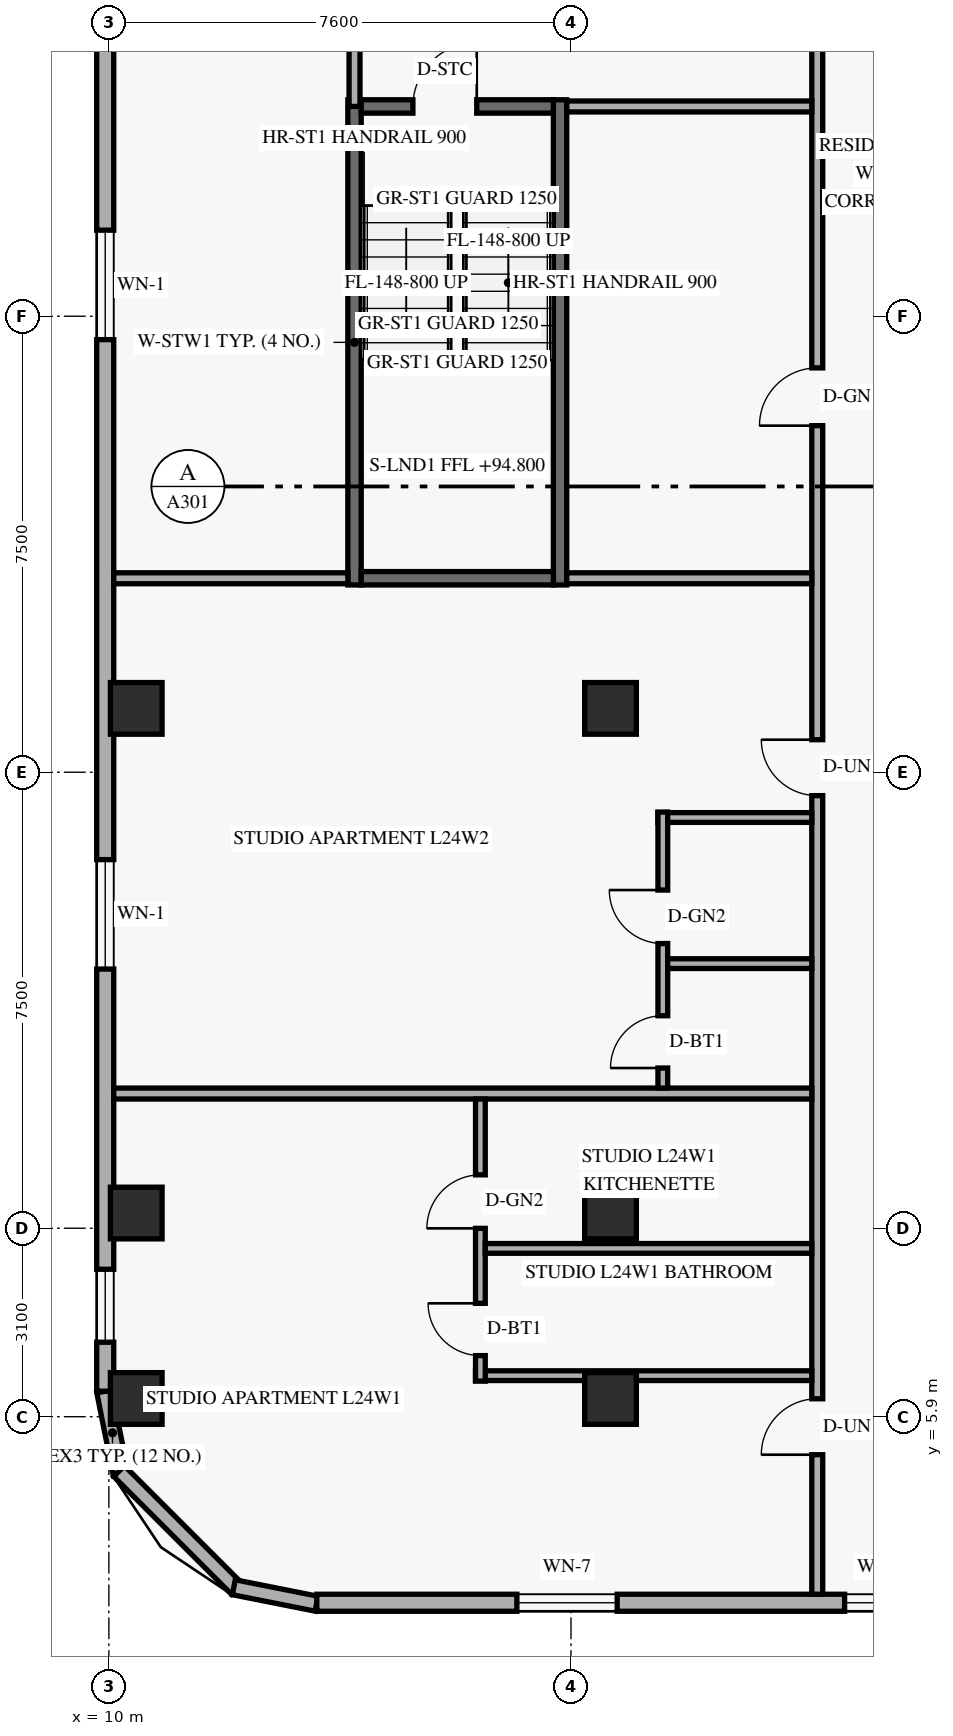
"""IFC4 building model, lengths in metres.
Left out: names, types, materials, properties, quantities, classifications, styles, units other than length and angle.
Written with IfcOpenShell. Run it as: python <this file> out.ifc"""

import sys

from ifc_helpers import new_model, si_unit, direction, frame, frame_2d, origin, origin_2d, place, context, subcontext, project, spatial, rectangle, extrude, element, fill, save


model = new_model("IFC4")
c1 = context("Model", 3, precision=1e-05, world=origin(), true_north=direction((0.0, 1.0)))
c2 = subcontext(c1, "Body", "Model", "MODEL_VIEW")
j1 = project(units=[si_unit("LENGTHUNIT", "METRE"), si_unit("PLANEANGLEUNIT", "RADIAN")], contexts=[c1])
p1 = place(None, origin())
s1 = spatial("IfcSite", under=j1, at=p1, CompositionType="ELEMENT")
p2 = place(p1, origin())
s2 = spatial("IfcBuilding", under=s1, at=p2, CompositionType="ELEMENT")
p3 = place(p2, frame((0.0, 0.0, 94.8)))
s3 = spatial("IfcBuildingStorey", under=s2, at=p3, CompositionType="ELEMENT", Elevation=94.8)
for number, where, z_axis, x_axis in (
    (1, (14.04, 19.58, 0.0), (0.0, 0.0, 1.0), (0.0, 1.0, 0.0)),
    (2, (17.42, 19.58, 0.0), (0.0, 0.0, 1.0), (0.0, 1.0, 0.0)),
):
    element("IfcWall", number, at=place(p3, frame(where, z_axis=z_axis, x_axis=x_axis)), inside=s3, PredefinedType="SHEAR", context=c2, shape_type="SweptSolid", body=[
        extrude(rectangle(XDim=7.98, YDim=0.22, at=frame_2d((3.99, 0.0))), origin(), (0.0, 0.0, 1.0), 2.739),
    ])
p4 = place(p3, frame((14.15, 19.69, 0.0), z_axis=(0.0, 0.0, 1.0), x_axis=(1.0, 0.0, 0.0)))
e3 = element("IfcWall", 3, at=p4, inside=s3, PredefinedType="SHEAR", context=c2, shape_type="SweptSolid", body=[
    extrude(rectangle(XDim=3.16, YDim=0.22, at=frame_2d((1.58, 0.0))), origin(), (0.0, 0.0, 1.0), 2.739),
])
p5 = place(p3, frame((14.15, 27.45, 0.0), z_axis=(0.0, 0.0, 1.0), x_axis=(1.0, 0.0, 0.0)))
e4 = element("IfcWall", 4, at=p5, inside=s3, PredefinedType="SHEAR", context=c2, shape_type="SweptSolid", body=[
    extrude(rectangle(XDim=3.16, YDim=0.22, at=frame_2d((1.58, 0.0))), origin(), (0.0, 0.0, 1.0), 2.739),
])
p6 = place(p5, frame((0.85, 0.0, 0.0)))
e5 = element("IfcOpeningElement", 5, at=p6, cuts=e4, PredefinedType="OPENING", context=c2, shape_type="SweptSolid", body=[
    extrude(rectangle(XDim=1.05, YDim=2.15, at=frame_2d((0.525, 1.075))), frame((0.0, 0.12, 0.0), z_axis=(0.0, -1.0, 0.0), x_axis=(1.0, 0.0, 0.0)), (0.0, 0.0, 1.0), 0.24),
])
for number, where, z_axis, x_axis in (
    (6, (10.45, 6.2, 0.0), (0.0, 0.0, 1.0), (1.0, 0.0, 0.0)),
    (7, (10.45, 9.25, 0.0), (0.0, 0.0, 1.0), (1.0, 0.0, 0.0)),
    (8, (10.45, 17.55, 0.0), (0.0, 0.0, 1.0), (1.0, 0.0, 0.0)),
    (9, (18.25, 6.2, 0.0), (0.0, 0.0, 1.0), (1.0, 0.0, 0.0)),
    (10, (18.25, 9.25, 0.0), (0.0, 0.0, 1.0), (1.0, 0.0, 0.0)),
    (11, (18.25, 17.55, 0.0), (0.0, 0.0, 1.0), (1.0, 0.0, 0.0)),
):
    element("IfcColumn", number, at=place(p3, frame(where, z_axis=z_axis, x_axis=x_axis)), inside=s3, PredefinedType="COLUMN", context=c2, shape_type="SweptSolid", body=[
        extrude(rectangle(XDim=0.85, YDim=0.85, at=origin_2d()), origin(), (0.0, 0.0, 1.0), 3.6),
    ])
p7 = place(p3, frame((9.924, 6.316, 0.0), z_axis=(0.0, 0.0, 1.0), x_axis=(0.195000137217, -0.980803214965, 0.0)))
e12 = element("IfcWall", 12, at=p7, inside=s3, PredefinedType="SOLIDWALL", context=c2, shape_type="SweptSolid", body=[
    extrude(rectangle(XDim=1.388, YDim=0.25, at=frame_2d((0.694, 0.0))), origin(), (0.0, 0.0, 1.0), 3.35),
])
p8 = place(p3, frame((10.168, 5.005, 0.0), z_axis=(0.0, 0.0, 1.0), x_axis=(0.707151344399, -0.707062215165, 0.0)))
e13 = element("IfcWall", 13, at=p8, inside=s3, PredefinedType="SOLIDWALL", context=c2, shape_type="SweptSolid", body=[
    extrude(rectangle(XDim=2.739, YDim=0.25, at=frame_2d((1.37, 0.0))), origin(), (0.0, 0.0, 1.0), 3.35),
])
p9 = place(p3, frame((12.054, 3.095, 0.0), z_axis=(0.0, 0.0, 1.0), x_axis=(0.980809899341, -0.19496651342, 0.0)))
e14 = element("IfcWall", 14, at=p9, inside=s3, PredefinedType="SOLIDWALL", context=c2, shape_type="SweptSolid", body=[
    extrude(rectangle(XDim=1.389, YDim=0.25, at=frame_2d((0.694, 0.0))), origin(), (0.0, 0.0, 1.0), 3.35),
])
p10 = place(p3, frame((13.42, 2.84, 0.0), z_axis=(0.0, 0.0, 1.0), x_axis=(1.0, 0.0, 0.0)))
e15 = element("IfcWall", 15, at=p10, inside=s3, PredefinedType="SOLIDWALL", context=c2, shape_type="SweptSolid", body=[
    extrude(rectangle(XDim=36.56, YDim=0.28, at=frame_2d((18.28, 0.0))), origin(), (0.0, 0.0, 1.0), 3.35),
])
p11 = place(p10, frame((3.29, 0.0, 0.85)))
e16 = element("IfcOpeningElement", 16, at=p11, cuts=e15, PredefinedType="OPENING", context=c2, shape_type="SweptSolid", body=[
    extrude(rectangle(XDim=1.65, YDim=1.6, at=frame_2d((0.825, 0.8))), frame((0.0, 0.15, 0.0), z_axis=(0.0, -1.0, 0.0), x_axis=(1.0, 0.0, 0.0)), (0.0, 0.0, 1.0), 0.3),
])
p12 = place(p10, frame((8.68, 0.0, 0.85)))
e17 = element("IfcOpeningElement", 17, at=p12, cuts=e15, PredefinedType="OPENING", context=c2, shape_type="SweptSolid", body=[
    extrude(rectangle(XDim=1.2, YDim=1.5, at=frame_2d((0.6, 0.75))), frame((0.0, 0.15, 0.0), z_axis=(0.0, -1.0, 0.0), x_axis=(1.0, 0.0, 0.0)), (0.0, 0.0, 1.0), 0.3),
])
p13 = place(p10, frame((12.248, 0.0, 0.85)))
e18 = element("IfcOpeningElement", 18, at=p13, cuts=e15, PredefinedType="OPENING", context=c2, shape_type="SweptSolid", body=[
    extrude(rectangle(XDim=1.65, YDim=1.6, at=frame_2d((0.825, 0.8))), frame((0.0, 0.15, 0.0), z_axis=(0.0, -1.0, 0.0), x_axis=(1.0, 0.0, 0.0)), (0.0, 0.0, 1.0), 0.3),
])
p14 = place(p10, frame((18.083, 0.0, 0.85)))
e19 = element("IfcOpeningElement", 19, at=p14, cuts=e15, PredefinedType="OPENING", context=c2, shape_type="SweptSolid", body=[
    extrude(rectangle(XDim=1.65, YDim=1.6, at=frame_2d((0.825, 0.8))), frame((0.0, 0.15, 0.0), z_axis=(0.0, -1.0, 0.0), x_axis=(1.0, 0.0, 0.0)), (0.0, 0.0, 1.0), 0.3),
])
p15 = place(p10, frame((22.465, 0.0, 0.85)))
e20 = element("IfcOpeningElement", 20, at=p15, cuts=e15, PredefinedType="OPENING", context=c2, shape_type="SweptSolid", body=[
    extrude(rectangle(XDim=1.2, YDim=1.5, at=frame_2d((0.6, 0.75))), frame((0.0, 0.15, 0.0), z_axis=(0.0, -1.0, 0.0), x_axis=(1.0, 0.0, 0.0)), (0.0, 0.0, 1.0), 0.3),
])
p16 = place(p10, frame((29.52, 0.0, 0.85)))
e21 = element("IfcOpeningElement", 21, at=p16, cuts=e15, PredefinedType="OPENING", context=c2, shape_type="SweptSolid", body=[
    extrude(rectangle(XDim=1.65, YDim=1.6, at=frame_2d((0.825, 0.8))), frame((0.0, 0.15, 0.0), z_axis=(0.0, -1.0, 0.0), x_axis=(1.0, 0.0, 0.0)), (0.0, 0.0, 1.0), 0.3),
])
p17 = place(p3, frame((9.94, 41.68, 0.0), z_axis=(0.0, 0.0, 1.0), x_axis=(0.0, -1.0, 0.0)))
e22 = element("IfcWall", 22, at=p17, inside=s3, PredefinedType="SOLIDWALL", context=c2, shape_type="SweptSolid", body=[
    extrude(rectangle(XDim=35.36, YDim=0.28, at=frame_2d((17.68, 0.0))), origin(), (0.0, 0.0, 1.0), 3.35),
])
p18 = place(p17, frame((33.355, 0.0, 0.85)))
e23 = element("IfcOpeningElement", 23, at=p18, cuts=e22, PredefinedType="OPENING", context=c2, shape_type="SweptSolid", body=[
    extrude(rectangle(XDim=1.2, YDim=1.5, at=frame_2d((0.6, 0.75))), frame((0.0, 0.15, 0.0), z_axis=(0.0, -1.0, 0.0), x_axis=(1.0, 0.0, 0.0)), (0.0, 0.0, 1.0), 0.3),
])
p19 = place(p17, frame((26.617, 0.0, 0.85)))
e24 = element("IfcOpeningElement", 24, at=p19, cuts=e22, PredefinedType="OPENING", context=c2, shape_type="SweptSolid", body=[
    extrude(rectangle(XDim=1.8, YDim=1.6, at=frame_2d((0.9, 0.8))), frame((0.0, 0.15, 0.0), z_axis=(0.0, -1.0, 0.0), x_axis=(1.0, 0.0, 0.0)), (0.0, 0.0, 1.0), 0.3),
])
p20 = place(p17, frame((16.265, 0.0, 0.85)))
e25 = element("IfcOpeningElement", 25, at=p20, cuts=e22, PredefinedType="OPENING", context=c2, shape_type="SweptSolid", body=[
    extrude(rectangle(XDim=1.8, YDim=1.6, at=frame_2d((0.9, 0.8))), frame((0.0, 0.15, 0.0), z_axis=(0.0, -1.0, 0.0), x_axis=(1.0, 0.0, 0.0)), (0.0, 0.0, 1.0), 0.3),
])
p21 = place(p17, frame((6.815, 0.0, 0.85)))
e26 = element("IfcOpeningElement", 26, at=p21, cuts=e22, PredefinedType="OPENING", context=c2, shape_type="SweptSolid", body=[
    extrude(rectangle(XDim=1.8, YDim=1.6, at=frame_2d((0.9, 0.8))), frame((0.0, 0.15, 0.0), z_axis=(0.0, -1.0, 0.0), x_axis=(1.0, 0.0, 0.0)), (0.0, 0.0, 1.0), 0.3),
])
p22 = place(p17, frame((0.805, 0.0, 0.85)))
e27 = element("IfcOpeningElement", 27, at=p22, cuts=e22, PredefinedType="OPENING", context=c2, shape_type="SweptSolid", body=[
    extrude(rectangle(XDim=1.2, YDim=1.5, at=frame_2d((0.6, 0.75))), frame((0.0, 0.15, 0.0), z_axis=(0.0, -1.0, 0.0), x_axis=(1.0, 0.0, 0.0)), (0.0, 0.0, 1.0), 0.3),
])
p23 = place(p3, frame((21.65, 2.98, 0.0), z_axis=(0.0, 0.0, 1.0), x_axis=(0.0, 1.0, 0.0)))
e28 = element("IfcWall", 28, at=p23, inside=s3, PredefinedType="STANDARD", context=c2, shape_type="SweptSolid", body=[
    extrude(rectangle(XDim=42.04, YDim=0.18, at=frame_2d((21.02, 0.0))), origin(), (0.0, 0.0, 1.0), 2.721),
])
p24 = place(p23, frame((2.295, 0.0, 0.0)))
e29 = element("IfcOpeningElement", 29, at=p24, cuts=e28, PredefinedType="OPENING", context=c2, shape_type="SweptSolid", body=[
    extrude(rectangle(XDim=0.92, YDim=2.15, at=frame_2d((0.46, 1.075))), frame((0.0, 0.1, 0.0), z_axis=(0.0, -1.0, 0.0), x_axis=(1.0, 0.0, 0.0)), (0.0, 0.0, 1.0), 0.2),
])
p25 = place(p23, frame((13.135, 0.0, 0.0)))
e30 = element("IfcOpeningElement", 30, at=p25, cuts=e28, PredefinedType="OPENING", context=c2, shape_type="SweptSolid", body=[
    extrude(rectangle(XDim=0.92, YDim=2.15, at=frame_2d((0.46, 1.075))), frame((0.0, 0.1, 0.0), z_axis=(0.0, -1.0, 0.0), x_axis=(1.0, 0.0, 0.0)), (0.0, 0.0, 1.0), 0.2),
])
p26 = place(p23, frame((19.22, 0.0, 0.0)))
e31 = element("IfcOpeningElement", 31, at=p26, cuts=e28, PredefinedType="OPENING", context=c2, shape_type="SweptSolid", body=[
    extrude(rectangle(XDim=0.95, YDim=2.15, at=frame_2d((0.475, 1.075))), frame((0.0, 0.1, 0.0), z_axis=(0.0, -1.0, 0.0), x_axis=(1.0, 0.0, 0.0)), (0.0, 0.0, 1.0), 0.2),
])
p27 = place(p23, frame((31.26, 0.0, 0.0)))
e32 = element("IfcOpeningElement", 32, at=p27, cuts=e28, PredefinedType="OPENING", context=c2, shape_type="SweptSolid", body=[
    extrude(rectangle(XDim=0.92, YDim=2.15, at=frame_2d((0.46, 1.075))), frame((0.0, 0.1, 0.0), z_axis=(0.0, -1.0, 0.0), x_axis=(1.0, 0.0, 0.0)), (0.0, 0.0, 1.0), 0.2),
])
p28 = place(p23, frame((39.31, 0.0, 0.0)))
e33 = element("IfcOpeningElement", 33, at=p28, cuts=e28, PredefinedType="OPENING", context=c2, shape_type="SweptSolid", body=[
    extrude(rectangle(XDim=0.92, YDim=2.15, at=frame_2d((0.46, 1.075))), frame((0.0, 0.1, 0.0), z_axis=(0.0, -1.0, 0.0), x_axis=(1.0, 0.0, 0.0)), (0.0, 0.0, 1.0), 0.2),
])
p29 = place(p3, frame((17.53, 27.45, 0.0), z_axis=(0.0, 0.0, 1.0), x_axis=(1.0, 0.0, 0.0)))
e34 = element("IfcWall", 34, at=p29, inside=s3, PredefinedType="STANDARD", context=c2, shape_type="SweptSolid", body=[
    extrude(rectangle(XDim=4.03, YDim=0.18, at=frame_2d((2.015, 0.0))), origin(), (0.0, 0.0, 1.0), 2.721),
])
p30 = place(p3, frame((14.04, 27.45, 0.0), z_axis=(0.0, 0.0, 1.0), x_axis=(0.0, 1.0, 0.0)))
e35 = element("IfcWall", 35, at=p30, inside=s3, PredefinedType="STANDARD", context=c2, shape_type="SweptSolid", body=[
    extrude(rectangle(XDim=1.8, YDim=0.18, at=frame_2d((0.9, 0.0))), origin(), (0.0, 0.0, 1.0), 2.721),
])
p31 = place(p3, frame((10.08, 11.215, 0.0), z_axis=(0.0, 0.0, 1.0), x_axis=(1.0, 0.0, 0.0)))
e36 = element("IfcWall", 36, at=p31, inside=s3, PredefinedType="PARTITIONING", context=c2, shape_type="SweptSolid", body=[
    extrude(rectangle(XDim=11.48, YDim=0.18, at=frame_2d((5.74, 0.0))), origin(), (0.0, 0.0, 1.0), 2.721),
])
p32 = place(p3, frame((10.08, 19.69, 0.0), z_axis=(0.0, 0.0, 1.0), x_axis=(1.0, 0.0, 0.0)))
e37 = element("IfcWall", 37, at=p32, inside=s3, PredefinedType="PARTITIONING", context=c2, shape_type="SweptSolid", body=[
    extrude(rectangle(XDim=3.85, YDim=0.18, at=frame_2d((1.925, 0.0))), origin(), (0.0, 0.0, 1.0), 2.721),
])
p33 = place(p3, frame((17.53, 19.69, 0.0), z_axis=(0.0, 0.0, 1.0), x_axis=(1.0, 0.0, 0.0)))
e38 = element("IfcWall", 38, at=p33, inside=s3, PredefinedType="PARTITIONING", context=c2, shape_type="SweptSolid", body=[
    extrude(rectangle(XDim=4.03, YDim=0.18, at=frame_2d((2.015, 0.0))), origin(), (0.0, 0.0, 1.0), 2.721),
])
p34 = place(p3, frame((16.03, 6.575, 0.0), z_axis=(0.0, 0.0, 1.0), x_axis=(1.0, 0.0, 0.0)))
e39 = element("IfcWall", 39, at=p34, inside=s3, PredefinedType="PLUMBINGWALL", context=c2, shape_type="SweptSolid", body=[
    extrude(rectangle(XDim=5.53, YDim=0.16, at=frame_2d((2.765, 0.0))), origin(), (0.0, 0.0, 1.0), 2.721),
])
p35 = place(p3, frame((16.11, 6.485, 0.0), z_axis=(0.0, 0.0, 1.0), x_axis=(0.0, 1.0, 0.0)))
e40 = element("IfcWall", 40, at=p35, inside=s3, PredefinedType="PLUMBINGWALL", context=c2, shape_type="SweptSolid", body=[
    extrude(rectangle(XDim=4.64, YDim=0.16, at=frame_2d((2.32, 0.0))), origin(), (0.0, 0.0, 1.0), 2.721),
])
p36 = place(p35, frame((0.42, 0.0, 0.0)))
e41 = element("IfcOpeningElement", 41, at=p36, cuts=e40, PredefinedType="OPENING", context=c2, shape_type="SweptSolid", body=[
    extrude(rectangle(XDim=0.86, YDim=2.12, at=frame_2d((0.43, 1.06))), frame((0.0, 0.09, 0.0), z_axis=(0.0, -1.0, 0.0), x_axis=(1.0, 0.0, 0.0)), (0.0, 0.0, 1.0), 0.18),
])
p37 = place(p35, frame((2.513, 0.0, 0.0)))
e42 = element("IfcOpeningElement", 42, at=p37, cuts=e40, PredefinedType="OPENING", context=c2, shape_type="SweptSolid", body=[
    extrude(rectangle(XDim=0.88, YDim=2.12, at=frame_2d((0.44, 1.06))), frame((0.0, 0.09, 0.0), z_axis=(0.0, -1.0, 0.0), x_axis=(1.0, 0.0, 0.0)), (0.0, 0.0, 1.0), 0.18),
])
p38 = place(p3, frame((16.19, 8.668, 0.0), z_axis=(0.0, 0.0, 1.0), x_axis=(1.0, 0.0, 0.0)))
e43 = element("IfcWall", 43, at=p38, inside=s3, PredefinedType="PLUMBINGWALL", context=c2, shape_type="SweptSolid", body=[
    extrude(rectangle(XDim=5.37, YDim=0.16, at=frame_2d((2.685, 0.0))), origin(), (0.0, 0.0, 1.0), 2.721),
])
p39 = place(p3, frame((19.03, 15.755, 0.0), z_axis=(0.0, 0.0, 1.0), x_axis=(1.0, 0.0, 0.0)))
e44 = element("IfcWall", 44, at=p39, inside=s3, PredefinedType="PLUMBINGWALL", context=c2, shape_type="SweptSolid", body=[
    extrude(rectangle(XDim=2.53, YDim=0.16, at=frame_2d((1.265, 0.0))), origin(), (0.0, 0.0, 1.0), 3.35),
])
p40 = place(p3, frame((19.11, 11.305, 0.0), z_axis=(0.0, 0.0, 1.0), x_axis=(0.0, 1.0, 0.0)))
e45 = element("IfcWall", 45, at=p40, inside=s3, PredefinedType="PLUMBINGWALL", context=c2, shape_type="SweptSolid", body=[
    extrude(rectangle(XDim=4.54, YDim=0.16, at=frame_2d((2.27, 0.0))), origin(), (0.0, 0.0, 1.0), 2.978),
])
p41 = place(p40, frame((0.33, 0.0, 0.0)))
e46 = element("IfcOpeningElement", 46, at=p41, cuts=e45, PredefinedType="OPENING", context=c2, shape_type="SweptSolid", body=[
    extrude(rectangle(XDim=0.86, YDim=2.12, at=frame_2d((0.43, 1.06))), frame((0.0, 0.09, 0.0), z_axis=(0.0, -1.0, 0.0), x_axis=(1.0, 0.0, 0.0)), (0.0, 0.0, 1.0), 0.18),
])
p42 = place(p40, frame((2.377, 0.0, 0.0)))
e47 = element("IfcOpeningElement", 47, at=p42, cuts=e45, PredefinedType="OPENING", context=c2, shape_type="SweptSolid", body=[
    extrude(rectangle(XDim=0.88, YDim=2.12, at=frame_2d((0.44, 1.06))), frame((0.0, 0.09, 0.0), z_axis=(0.0, -1.0, 0.0), x_axis=(1.0, 0.0, 0.0)), (0.0, 0.0, 1.0), 0.18),
])
p43 = place(p3, frame((19.19, 13.352, 0.0), z_axis=(0.0, 0.0, 1.0), x_axis=(1.0, 0.0, 0.0)))
e48 = element("IfcWall", 48, at=p43, inside=s3, PredefinedType="PLUMBINGWALL", context=c2, shape_type="SweptSolid", body=[
    extrude(rectangle(XDim=2.37, YDim=0.16, at=frame_2d((1.185, 0.0))), origin(), (0.0, 0.0, 1.0), 3.35),
])
p44 = place(p11, origin())
e49 = element("IfcWindow", 49, at=p44, inside=s3, PartitioningType="SINGLE_PANEL", PredefinedType="WINDOW", context=c2, shape_type="SweptSolid", body=[
    extrude(rectangle(XDim=1.65, YDim=1.6, at=frame_2d((0.825, 0.8))), frame((0.0, 0.03, 0.0), z_axis=(0.0, -1.0, 0.0), x_axis=(1.0, 0.0, 0.0)), (0.0, 0.0, 1.0), 0.06),
])
fill(e16, e49)
p45 = place(p12, origin())
e50 = element("IfcWindow", 50, at=p45, inside=s3, PartitioningType="SINGLE_PANEL", PredefinedType="WINDOW", context=c2, shape_type="SweptSolid", body=[
    extrude(rectangle(XDim=1.2, YDim=1.5, at=frame_2d((0.6, 0.75))), frame((0.0, 0.03, 0.0), z_axis=(0.0, -1.0, 0.0), x_axis=(1.0, 0.0, 0.0)), (0.0, 0.0, 1.0), 0.06),
])
fill(e17, e50)
p46 = place(p18, origin())
e51 = element("IfcWindow", 51, at=p46, inside=s3, PartitioningType="SINGLE_PANEL", PredefinedType="WINDOW", context=c2, shape_type="SweptSolid", body=[
    extrude(rectangle(XDim=1.2, YDim=1.5, at=frame_2d((0.6, 0.75))), frame((0.0, 0.03, 0.0), z_axis=(0.0, -1.0, 0.0), x_axis=(1.0, 0.0, 0.0)), (0.0, 0.0, 1.0), 0.06),
])
fill(e23, e51)
p47 = place(p19, origin())
e52 = element("IfcWindow", 52, at=p47, inside=s3, PartitioningType="SINGLE_PANEL", PredefinedType="WINDOW", context=c2, shape_type="SweptSolid", body=[
    extrude(rectangle(XDim=1.8, YDim=1.6, at=frame_2d((0.9, 0.8))), frame((0.0, 0.03, 0.0), z_axis=(0.0, -1.0, 0.0), x_axis=(1.0, 0.0, 0.0)), (0.0, 0.0, 1.0), 0.06),
])
fill(e24, e52)
p48 = place(p20, origin())
e53 = element("IfcWindow", 53, at=p48, inside=s3, PartitioningType="SINGLE_PANEL", PredefinedType="WINDOW", context=c2, shape_type="SweptSolid", body=[
    extrude(rectangle(XDim=1.8, YDim=1.6, at=frame_2d((0.9, 0.8))), frame((0.0, 0.03, 0.0), z_axis=(0.0, -1.0, 0.0), x_axis=(1.0, 0.0, 0.0)), (0.0, 0.0, 1.0), 0.06),
])
fill(e25, e53)
p49 = place(p6, frame((1.05, 0.0, 0.0), z_axis=(0.0, 0.0, 1.0), x_axis=(-1.0, 0.0, 0.0)))
e54 = element("IfcDoor", 54, at=p49, inside=s3, OperationType="SINGLE_SWING_LEFT", PredefinedType="DOOR", context=c2, shape_type="SweptSolid", body=[
    extrude(rectangle(XDim=1.05, YDim=2.15, at=frame_2d((0.525, 1.075))), frame((0.0, 0.025, 0.0), z_axis=(0.0, -1.0, 0.0), x_axis=(1.0, 0.0, 0.0)), (0.0, 0.0, 1.0), 0.05),
])
fill(e5, e54)
p50 = place(p24, origin())
e55 = element("IfcDoor", 55, at=p50, inside=s3, OperationType="SINGLE_SWING_LEFT", PredefinedType="DOOR", context=c2, shape_type="SweptSolid", body=[
    extrude(rectangle(XDim=0.92, YDim=2.15, at=frame_2d((0.46, 1.075))), frame((0.0, 0.025, 0.0), z_axis=(0.0, -1.0, 0.0), x_axis=(1.0, 0.0, 0.0)), (0.0, 0.0, 1.0), 0.05),
])
fill(e29, e55)
p51 = place(p36, origin())
e56 = element("IfcDoor", 56, at=p51, inside=s3, OperationType="SINGLE_SWING_RIGHT", PredefinedType="DOOR", context=c2, shape_type="SweptSolid", body=[
    extrude(rectangle(XDim=0.86, YDim=2.12, at=frame_2d((0.43, 1.06))), frame((0.0, 0.025, 0.0), z_axis=(0.0, -1.0, 0.0), x_axis=(1.0, 0.0, 0.0)), (0.0, 0.0, 1.0), 0.05),
])
fill(e41, e56)
p52 = place(p37, origin())
e57 = element("IfcDoor", 57, at=p52, inside=s3, OperationType="SINGLE_SWING_LEFT", PredefinedType="DOOR", context=c2, shape_type="SweptSolid", body=[
    extrude(rectangle(XDim=0.88, YDim=2.12, at=frame_2d((0.44, 1.06))), frame((0.0, 0.025, 0.0), z_axis=(0.0, -1.0, 0.0), x_axis=(1.0, 0.0, 0.0)), (0.0, 0.0, 1.0), 0.05),
])
fill(e42, e57)
p53 = place(p25, origin())
e58 = element("IfcDoor", 58, at=p53, inside=s3, OperationType="SINGLE_SWING_RIGHT", PredefinedType="DOOR", context=c2, shape_type="SweptSolid", body=[
    extrude(rectangle(XDim=0.92, YDim=2.15, at=frame_2d((0.46, 1.075))), frame((0.0, 0.025, 0.0), z_axis=(0.0, -1.0, 0.0), x_axis=(1.0, 0.0, 0.0)), (0.0, 0.0, 1.0), 0.05),
])
fill(e30, e58)
p54 = place(p41, origin())
e59 = element("IfcDoor", 59, at=p54, inside=s3, OperationType="SINGLE_SWING_LEFT", PredefinedType="DOOR", context=c2, shape_type="SweptSolid", body=[
    extrude(rectangle(XDim=0.86, YDim=2.12, at=frame_2d((0.43, 1.06))), frame((0.0, 0.025, 0.0), z_axis=(0.0, -1.0, 0.0), x_axis=(1.0, 0.0, 0.0)), (0.0, 0.0, 1.0), 0.05),
])
fill(e46, e59)
p55 = place(p42, origin())
e60 = element("IfcDoor", 60, at=p55, inside=s3, OperationType="SINGLE_SWING_RIGHT", PredefinedType="DOOR", context=c2, shape_type="SweptSolid", body=[
    extrude(rectangle(XDim=0.88, YDim=2.12, at=frame_2d((0.44, 1.06))), frame((0.0, 0.025, 0.0), z_axis=(0.0, -1.0, 0.0), x_axis=(1.0, 0.0, 0.0)), (0.0, 0.0, 1.0), 0.05),
])
fill(e47, e60)
p56 = place(p26, origin())
e61 = element("IfcDoor", 61, at=p56, inside=s3, OperationType="SINGLE_SWING_LEFT", PredefinedType="DOOR", context=c2, shape_type="SweptSolid", body=[
    extrude(rectangle(XDim=0.95, YDim=2.15, at=frame_2d((0.475, 1.075))), frame((0.0, 0.025, 0.0), z_axis=(0.0, -1.0, 0.0), x_axis=(1.0, 0.0, 0.0)), (0.0, 0.0, 1.0), 0.05),
])
fill(e31, e61)
save(model, sys.argv[1])
